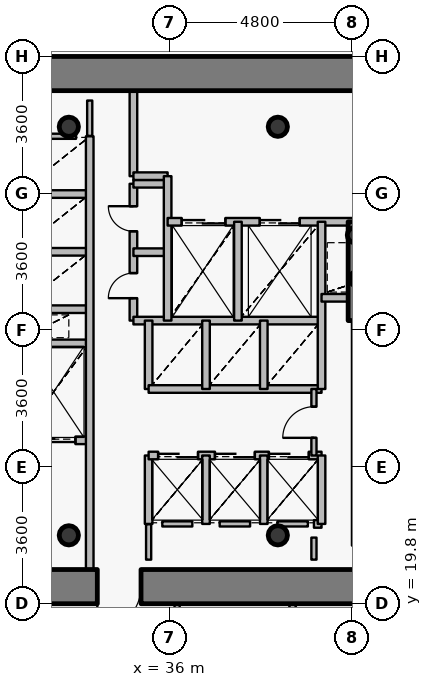
"""IFC4 building model, lengths in metres.
Left out: names, types, materials, properties, quantities, classifications, styles, units other than length and angle.
Written with IfcOpenShell. Run it as: python <this file> out.ifc"""

import sys

from ifc_helpers import new_model, si_unit, direction, frame, frame_2d, origin, origin_2d, place, context, subcontext, project, spatial, rectangle, hollow_circle, extrude, source, transform, mapped, element, fill, save


model = new_model("IFC4")
c1 = context("Model", 3, precision=1e-05, world=origin(), true_north=direction((0.0, 1.0)))
c2 = subcontext(c1, "Body", "Model", "MODEL_VIEW")
j1 = project(units=[si_unit("LENGTHUNIT", "METRE"), si_unit("PLANEANGLEUNIT", "RADIAN")], contexts=[c1])
p1 = place(None, origin())
s1 = spatial("IfcSite", under=j1, at=p1, CompositionType="ELEMENT")
p2 = place(p1, origin())
s2 = spatial("IfcBuilding", under=s1, at=p2, CompositionType="ELEMENT")
p3 = place(p2, frame((0.0, 0.0, 36.6)))
s3 = spatial("IfcBuildingStorey", under=s2, at=p3, CompositionType="ELEMENT", Elevation=36.6)
for number, where, z_axis, x_axis in (
    (1, (33.35, 21.6, 0.0), (0.0, 0.0, 1.0), (1.0, 0.0, 0.0)),
    (2, (38.85, 21.6, 0.0), (0.0, 0.0, 1.0), (1.0, 0.0, 0.0)),
    (3, (38.85, 32.35, 0.0), (0.0, 0.0, 1.0), (1.0, 0.0, 0.0)),
    (4, (33.35, 32.35, 0.0), (0.0, 0.0, 1.0), (1.0, 0.0, 0.0)),
):
    element("IfcColumn", number, at=place(p3, frame(where, z_axis=z_axis, x_axis=x_axis)), inside=s3, PredefinedType="COLUMN", context=c2, shape_type="SweptSolid", body=[
        extrude(hollow_circle(Radius=0.254, WallThickness=0.02, at=origin_2d()), origin(), (0.0, 0.0, 1.0), 4.2),
    ])
for number, where, z_axis, x_axis in (
    (5, (40.95, 28.35, 0.0), (0.0, 0.0, 1.0), (1.0, 0.0, 0.0)),
    (6, (40.88, 29.5, 0.0), (0.0, 0.0, 1.0), (1.0, 0.0, 0.0)),
):
    element("IfcColumn", number, at=place(p3, frame(where, z_axis=z_axis, x_axis=x_axis)), inside=s3, PredefinedType="COLUMN", context=c2, shape_type="SweptSolid", body=[
        extrude(hollow_circle(Radius=0.203, WallThickness=0.016, at=origin_2d()), origin(), (0.0, 0.0, 1.0), 4.2),
    ])
p4 = place(p3, frame((26.75, 33.75, 0.0), z_axis=(0.0, 0.0, 1.0), x_axis=(1.0, 0.0, 0.0)))
e7 = element("IfcWall", 7, at=p4, inside=s3, PredefinedType="SHEAR", context=c2, shape_type="SweptSolid", body=[
    extrude(rectangle(XDim=18.5, YDim=0.9, at=frame_2d((9.25, 0.0))), origin(), (0.0, 0.0, 1.0), 3.4),
])
p5 = place(p3, frame((45.25, 20.25, 0.0), z_axis=(0.0, 0.0, 1.0), x_axis=(-1.0, 0.0, 0.0)))
e8 = element("IfcWall", 8, at=p5, inside=s3, PredefinedType="SHEAR", context=c2, shape_type="SweptSolid", body=[
    extrude(rectangle(XDim=18.5, YDim=0.9, at=frame_2d((9.25, 0.0))), origin(), (0.0, 0.0, 1.0), 3.4),
])
p6 = place(p5, frame((10.0, 0.0, 0.0)))
e9 = element("IfcOpeningElement", 9, at=p6, cuts=e8, PredefinedType="OPENING", context=c2, shape_type="SweptSolid", body=[
    extrude(rectangle(XDim=1.15, YDim=2.15, at=origin_2d()), frame((0.575, 0.46, 1.075), z_axis=(0.0, -1.0, 0.0), x_axis=(1.0, 0.0, 0.0)), (0.0, 0.0, 1.0), 0.92),
])
p7 = place(p3, frame((40.9, 27.25, 0.0), z_axis=(0.0, 0.0, 1.0), x_axis=(0.0, 1.0, 0.0)))
e10 = element("IfcWall", 10, at=p7, inside=s3, PredefinedType="SHEAR", context=c2, shape_type="SweptSolid", body=[
    extrude(rectangle(XDim=2.6, YDim=0.4, at=frame_2d((1.3, 0.0))), origin(), (0.0, 0.0, 1.0), 3.55),
])
p8 = place(p3, frame((32.0, 24.1, 0.0), z_axis=(0.0, 0.0, 1.0), x_axis=(1.0, 0.0, 0.0)))
e11 = element("IfcWall", 11, at=p8, inside=s3, PredefinedType="PARTITIONING", context=c2, shape_type="SweptSolid", body=[
    extrude(rectangle(XDim=1.9, YDim=0.2, at=frame_2d((0.95, 0.0))), origin(), (0.0, 0.0, 1.0), 3.535),
])
p9 = place(p8, frame((0.375, 0.0, 0.0)))
e12 = element("IfcOpeningElement", 12, at=p9, cuts=e11, PredefinedType="OPENING", context=c2, shape_type="SweptSolid", body=[
    extrude(rectangle(XDim=1.15, YDim=2.15, at=origin_2d()), frame((0.575, 0.11, 1.075), z_axis=(0.0, -1.0, 0.0), x_axis=(1.0, 0.0, 0.0)), (0.0, 0.0, 1.0), 0.22),
])
for number, where, z_axis, x_axis in (
    (13, (32.0, 26.65, 0.0), (0.0, 0.0, 1.0), (1.0, 0.0, 0.0)),
    (14, (32.0, 27.55, 0.0), (0.0, 0.0, 1.0), (1.0, 0.0, 0.0)),
    (15, (32.0, 29.06, 0.0), (0.0, 0.0, 1.0), (1.0, 0.0, 0.0)),
    (16, (32.0, 30.58, 0.0), (0.0, 0.0, 1.0), (1.0, 0.0, 0.0)),
):
    element("IfcWall", number, at=place(p3, frame(where, z_axis=z_axis, x_axis=x_axis)), inside=s3, PredefinedType="PARTITIONING", context=c2, shape_type="SweptSolid", body=[
        extrude(rectangle(XDim=1.9, YDim=0.2, at=frame_2d((0.95, 0.0))), origin(), (0.0, 0.0, 1.0), 3.535),
    ])
p10 = place(p3, frame((33.9, 20.7, 0.0), z_axis=(0.0, 0.0, 1.0), x_axis=(0.0, 1.0, 0.0)))
e17 = element("IfcWall", 17, at=p10, inside=s3, PredefinedType="PARTITIONING", context=c2, shape_type="SweptSolid", body=[
    extrude(rectangle(XDim=11.4, YDim=0.2, at=frame_2d((5.7, 0.0))), origin(), (0.0, 0.0, 1.0), 3.535),
])
p11 = place(p3, frame((35.05, 27.25, 0.0), z_axis=(0.0, 0.0, 1.0), x_axis=(0.0, 1.0, 0.0)))
e18 = element("IfcWall", 18, at=p11, inside=s3, PredefinedType="PARTITIONING", context=c2, shape_type="SweptSolid", body=[
    extrude(rectangle(XDim=3.6, YDim=0.2, at=frame_2d((1.8, 0.0))), origin(), (0.0, 0.0, 1.0), 3.95),
])
p12 = place(p11, frame((0.59, 0.0, 0.0)))
e19 = element("IfcOpeningElement", 19, at=p12, cuts=e18, PredefinedType="OPENING", context=c2, shape_type="SweptSolid", body=[
    extrude(rectangle(XDim=0.66, YDim=2.05, at=origin_2d()), frame((0.33, 0.11, 1.025), z_axis=(0.0, -1.0, 0.0), x_axis=(1.0, 0.0, 0.0)), (0.0, 0.0, 1.0), 0.22),
])
p13 = place(p11, frame((2.35, 0.0, 0.0)))
e20 = element("IfcOpeningElement", 20, at=p13, cuts=e18, PredefinedType="OPENING", context=c2, shape_type="SweptSolid", body=[
    extrude(rectangle(XDim=0.66, YDim=2.05, at=origin_2d()), frame((0.33, 0.11, 1.025), z_axis=(0.0, -1.0, 0.0), x_axis=(1.0, 0.0, 0.0)), (0.0, 0.0, 1.0), 0.22),
])
p14 = place(p3, frame((35.05, 27.25, 0.0), z_axis=(0.0, 0.0, 1.0), x_axis=(1.0, 0.0, 0.0)))
e21 = element("IfcWall", 21, at=p14, inside=s3, PredefinedType="PARTITIONING", context=c2, shape_type="SweptSolid", body=[
    extrude(rectangle(XDim=4.95, YDim=0.2, at=frame_2d((2.475, 0.0))), origin(), (0.0, 0.0, 1.0), 3.535),
])
for number, where, z_axis, x_axis in (
    (22, (35.05, 29.05, 0.0), (0.0, 0.0, 1.0), (1.0, 0.0, 0.0)),
    (23, (35.05, 30.85, 0.0), (0.0, 0.0, 1.0), (1.0, 0.0, 0.0)),
):
    element("IfcWall", number, at=place(p3, frame(where, z_axis=z_axis, x_axis=x_axis)), inside=s3, PredefinedType="PARTITIONING", context=c2, shape_type="SweptSolid", body=[
        extrude(rectangle(XDim=0.9, YDim=0.2, at=frame_2d((0.45, 0.0))), origin(), (0.0, 0.0, 1.0), 3.95),
    ])
p15 = place(p3, frame((35.05, 31.05, 0.0), z_axis=(0.0, 0.0, 1.0), x_axis=(0.0, 1.0, 0.0)))
e24 = element("IfcWall", 24, at=p15, inside=s3, PredefinedType="PARTITIONING", context=c2, shape_type="SweptSolid", body=[
    extrude(rectangle(XDim=2.25, YDim=0.2, at=frame_2d((1.125, 0.0))), origin(), (0.0, 0.0, 1.0), 3.535),
])
p16 = place(p3, frame((35.05, 31.05, 0.0), z_axis=(0.0, 0.0, 1.0), x_axis=(1.0, 0.0, 0.0)))
e25 = element("IfcWall", 25, at=p16, inside=s3, PredefinedType="PARTITIONING", context=c2, shape_type="SweptSolid", body=[
    extrude(rectangle(XDim=0.9, YDim=0.2, at=frame_2d((0.45, 0.0))), origin(), (0.0, 0.0, 1.0), 3.95),
])
p17 = place(p3, frame((35.45, 21.9, 0.0), z_axis=(0.0, 0.0, 1.0), x_axis=(0.0, 1.0, 0.0)))
e26 = element("IfcWall", 26, at=p17, inside=s3, PredefinedType="PARTITIONING", context=c2, shape_type="SweptSolid", body=[
    extrude(rectangle(XDim=1.8, YDim=0.2, at=frame_2d((0.9, 0.0))), origin(), (0.0, 0.0, 1.0), 3.95),
])
p18 = place(p3, frame((35.45, 23.7, 0.0), z_axis=(0.0, 0.0, 1.0), x_axis=(1.0, 0.0, 0.0)))
e27 = element("IfcWall", 27, at=p18, inside=s3, PredefinedType="PARTITIONING", context=c2, shape_type="SweptSolid", body=[
    extrude(rectangle(XDim=4.55, YDim=0.2, at=frame_2d((2.275, 0.0))), origin(), (0.0, 0.0, 1.0), 3.535),
])
p19 = place(p18, frame((0.25, 0.0, 0.0)))
e28 = element("IfcOpeningElement", 28, at=p19, cuts=e27, PredefinedType="OPENING", context=c2, shape_type="SweptSolid", body=[
    extrude(rectangle(XDim=1.05, YDim=2.15, at=origin_2d()), frame((0.525, 0.11, 1.075), z_axis=(0.0, -1.0, 0.0), x_axis=(1.0, 0.0, 0.0)), (0.0, 0.0, 1.0), 0.22),
])
p20 = place(p18, frame((1.745, 0.0, 0.0)))
e29 = element("IfcOpeningElement", 29, at=p20, cuts=e27, PredefinedType="OPENING", context=c2, shape_type="SweptSolid", body=[
    extrude(rectangle(XDim=1.05, YDim=2.15, at=origin_2d()), frame((0.525, 0.11, 1.075), z_axis=(0.0, -1.0, 0.0), x_axis=(1.0, 0.0, 0.0)), (0.0, 0.0, 1.0), 0.22),
])
p21 = place(p18, frame((3.165, 0.0, 0.0)))
e30 = element("IfcOpeningElement", 30, at=p21, cuts=e27, PredefinedType="OPENING", context=c2, shape_type="SweptSolid", body=[
    extrude(rectangle(XDim=1.05, YDim=2.15, at=origin_2d()), frame((0.525, 0.11, 1.075), z_axis=(0.0, -1.0, 0.0), x_axis=(1.0, 0.0, 0.0)), (0.0, 0.0, 1.0), 0.22),
])
p22 = place(p3, frame((35.45, 25.45, 0.0), z_axis=(0.0, 0.0, 1.0), x_axis=(0.0, 1.0, 0.0)))
e31 = element("IfcWall", 31, at=p22, inside=s3, PredefinedType="PARTITIONING", context=c2, shape_type="SweptSolid", body=[
    extrude(rectangle(XDim=1.8, YDim=0.2, at=frame_2d((0.9, 0.0))), origin(), (0.0, 0.0, 1.0), 3.95),
])
p23 = place(p3, frame((35.45, 25.45, 0.0), z_axis=(0.0, 0.0, 1.0), x_axis=(1.0, 0.0, 0.0)))
e32 = element("IfcWall", 32, at=p23, inside=s3, PredefinedType="PARTITIONING", context=c2, shape_type="SweptSolid", body=[
    extrude(rectangle(XDim=4.55, YDim=0.2, at=frame_2d((2.275, 0.0))), origin(), (0.0, 0.0, 1.0), 3.535),
])
p24 = place(p3, frame((35.95, 27.25, 0.0), z_axis=(0.0, 0.0, 1.0), x_axis=(0.0, 1.0, 0.0)))
e33 = element("IfcWall", 33, at=p24, inside=s3, PredefinedType="PARTITIONING", context=c2, shape_type="SweptSolid", body=[
    extrude(rectangle(XDim=3.8, YDim=0.2, at=frame_2d((1.9, 0.0))), origin(), (0.0, 0.0, 1.0), 3.95),
])
p25 = place(p3, frame((35.95, 29.85, 0.0), z_axis=(0.0, 0.0, 1.0), x_axis=(1.0, 0.0, 0.0)))
e34 = element("IfcWall", 34, at=p25, inside=s3, PredefinedType="PARTITIONING", context=c2, shape_type="SweptSolid", body=[
    extrude(rectangle(XDim=8.49, YDim=0.2, at=frame_2d((4.245, 0.0))), origin(), (0.0, 0.0, 1.0), 3.535),
])
p26 = place(p25, frame((6.1, 0.0, 0.0)))
e35 = element("IfcOpeningElement", 35, at=p26, cuts=e34, PredefinedType="OPENING", context=c2, shape_type="SweptSolid", body=[
    extrude(rectangle(XDim=1.2, YDim=2.15, at=origin_2d()), frame((0.6, 0.11, 1.075), z_axis=(0.0, -1.0, 0.0), x_axis=(1.0, 0.0, 0.0)), (0.0, 0.0, 1.0), 0.22),
])
p27 = place(p25, frame((0.37, 0.0, 0.0)))
e36 = element("IfcOpeningElement", 36, at=p27, cuts=e34, PredefinedType="OPENING", context=c2, shape_type="SweptSolid", body=[
    extrude(rectangle(XDim=1.15, YDim=2.15, at=origin_2d()), frame((0.575, 0.11, 1.075), z_axis=(0.0, -1.0, 0.0), x_axis=(1.0, 0.0, 0.0)), (0.0, 0.0, 1.0), 0.22),
])
p28 = place(p25, frame((2.425, 0.0, 0.0)))
e37 = element("IfcOpeningElement", 37, at=p28, cuts=e34, PredefinedType="OPENING", context=c2, shape_type="SweptSolid", body=[
    extrude(rectangle(XDim=1.05, YDim=2.15, at=origin_2d()), frame((0.525, 0.11, 1.075), z_axis=(0.0, -1.0, 0.0), x_axis=(1.0, 0.0, 0.0)), (0.0, 0.0, 1.0), 0.22),
])
p29 = place(p3, frame((36.2, 17.9, 0.0), z_axis=(0.0, 0.0, 1.0), x_axis=(0.0, 1.0, 0.0)))
e38 = element("IfcWall", 38, at=p29, inside=s3, PredefinedType="PARTITIONING", context=c2, shape_type="SweptSolid", body=[
    extrude(rectangle(XDim=1.9, YDim=0.135, at=frame_2d((0.95, 0.0))), origin(), (0.0, 0.0, 1.0), 3.285),
])
for number, where, z_axis, x_axis in (
    (39, (36.96, 21.9, 0.0), (0.0, 0.0, 1.0), (0.0, 1.0, 0.0)),
    (40, (36.96, 25.45, 0.0), (0.0, 0.0, 1.0), (0.0, 1.0, 0.0)),
):
    element("IfcWall", number, at=place(p3, frame(where, z_axis=z_axis, x_axis=x_axis)), inside=s3, PredefinedType="PARTITIONING", context=c2, shape_type="SweptSolid", body=[
        extrude(rectangle(XDim=1.8, YDim=0.2, at=frame_2d((0.9, 0.0))), origin(), (0.0, 0.0, 1.0), 3.95),
    ])
p30 = place(p3, frame((37.8, 27.25, 0.0), z_axis=(0.0, 0.0, 1.0), x_axis=(0.0, 1.0, 0.0)))
e41 = element("IfcWall", 41, at=p30, inside=s3, PredefinedType="PARTITIONING", context=c2, shape_type="SweptSolid", body=[
    extrude(rectangle(XDim=2.6, YDim=0.2, at=frame_2d((1.3, 0.0))), origin(), (0.0, 0.0, 1.0), 3.95),
])
for number, where, z_axis, x_axis in (
    (42, (38.48, 21.9, 0.0), (0.0, 0.0, 1.0), (0.0, 1.0, 0.0)),
    (43, (38.48, 25.45, 0.0), (0.0, 0.0, 1.0), (0.0, 1.0, 0.0)),
):
    element("IfcWall", number, at=place(p3, frame(where, z_axis=z_axis, x_axis=x_axis)), inside=s3, PredefinedType="PARTITIONING", context=c2, shape_type="SweptSolid", body=[
        extrude(rectangle(XDim=1.8, YDim=0.2, at=frame_2d((0.9, 0.0))), origin(), (0.0, 0.0, 1.0), 3.95),
    ])
p31 = place(p3, frame((39.206, 19.8, 0.0), z_axis=(0.0, 0.0, 1.0), x_axis=(0.406734516924, -0.913546404263, 0.0)))
e44 = element("IfcWall", 44, at=p31, inside=s3, PredefinedType="PARTITIONING", context=c2, shape_type="SweptSolid", body=[
    extrude(rectangle(XDim=17.213, YDim=0.15, at=frame_2d((8.606, 0.0))), origin(), (0.0, 0.0, 1.0), 3.285),
])
p32 = place(p31, frame((4.228, 0.0, 0.0)))
e45 = element("IfcOpeningElement", 45, at=p32, cuts=e44, PredefinedType="OPENING", context=c2, shape_type="SweptSolid", body=[
    extrude(rectangle(XDim=0.82, YDim=2.1, at=origin_2d()), frame((0.41, 0.085, 1.05), z_axis=(0.0, -1.0, 0.0), x_axis=(1.0, 0.0, 0.0)), (0.0, 0.0, 1.0), 0.17),
])
p33 = place(p31, frame((12.679, 0.0, 0.0)))
e46 = element("IfcOpeningElement", 46, at=p33, cuts=e44, PredefinedType="OPENING", context=c2, shape_type="SweptSolid", body=[
    extrude(rectangle(XDim=1.05, YDim=2.15, at=origin_2d()), frame((0.525, 0.085, 1.075), z_axis=(0.0, -1.0, 0.0), x_axis=(1.0, 0.0, 0.0)), (0.0, 0.0, 1.0), 0.17),
])
p34 = place(p3, frame((39.8, 21.9, 0.0), z_axis=(0.0, 0.0, 1.0), x_axis=(1.0, 0.0, 0.0)))
e47 = element("IfcWall", 47, at=p34, inside=s3, PredefinedType="PARTITIONING", context=c2, shape_type="SweptSolid", body=[
    extrude(rectangle(XDim=0.2, YDim=0.2, at=frame_2d((0.1, 0.0))), origin(), (0.0, 0.0, 1.0), 3.95),
])
p35 = place(p3, frame((39.8, 23.7, 0.0), z_axis=(0.0, 0.0, 1.0), x_axis=(0.0, 1.0, 0.0)))
e48 = element("IfcWall", 48, at=p35, inside=s3, PredefinedType="PARTITIONING", context=c2, shape_type="SweptSolid", body=[
    extrude(rectangle(XDim=1.75, YDim=0.135, at=frame_2d((0.875, 0.0))), origin(), (0.0, 0.0, 1.0), 3.95),
])
p36 = place(p35, frame((0.465, 0.0, 0.0)))
e49 = element("IfcOpeningElement", 49, at=p36, cuts=e48, PredefinedType="OPENING", context=c2, shape_type="SweptSolid", body=[
    extrude(rectangle(XDim=0.82, YDim=2.1, at=origin_2d()), frame((0.41, 0.078, 1.05), z_axis=(0.0, -1.0, 0.0), x_axis=(1.0, 0.0, 0.0)), (0.0, 0.0, 1.0), 0.155),
])
p37 = place(p3, frame((40.0, 21.9, 0.0), z_axis=(0.0, 0.0, 1.0), x_axis=(0.0, 1.0, 0.0)))
e50 = element("IfcWall", 50, at=p37, inside=s3, PredefinedType="PARTITIONING", context=c2, shape_type="SweptSolid", body=[
    extrude(rectangle(XDim=1.8, YDim=0.2, at=frame_2d((0.9, 0.0))), origin(), (0.0, 0.0, 1.0), 3.95),
])
p38 = place(p3, frame((40.0, 25.45, 0.0), z_axis=(0.0, 0.0, 1.0), x_axis=(0.0, 1.0, 0.0)))
e51 = element("IfcWall", 51, at=p38, inside=s3, PredefinedType="PARTITIONING", context=c2, shape_type="SweptSolid", body=[
    extrude(rectangle(XDim=4.4, YDim=0.2, at=frame_2d((2.2, 0.0))), origin(), (0.0, 0.0, 1.0), 3.95),
])
p39 = place(p3, frame((40.0, 27.85, 0.0), z_axis=(0.0, 0.0, 1.0), x_axis=(1.0, 0.0, 0.0)))
e52 = element("IfcWall", 52, at=p39, inside=s3, PredefinedType="PARTITIONING", context=c2, shape_type="SweptSolid", body=[
    extrude(rectangle(XDim=0.9, YDim=0.2, at=frame_2d((0.45, 0.0))), origin(), (0.0, 0.0, 1.0), 3.95),
])
p40 = place(p3, frame((40.9, 21.33, 0.0), z_axis=(0.0, 0.0, 1.0), x_axis=(0.0, 1.0, 0.0)))
e53 = element("IfcWall", 53, at=p40, inside=s3, PredefinedType="PARTITIONING", context=c2, shape_type="SweptSolid", body=[
    extrude(rectangle(XDim=5.91, YDim=0.2, at=frame_2d((2.955, 0.0))), origin(), (0.0, 0.0, 1.0), 3.485),
])
p41 = place(p3, frame((36.6, 21.9, 0.0), z_axis=(0.0, 0.0, 1.0), x_axis=(-1.0, 0.0, 0.0)))
e54 = element("IfcWall", 54, at=p41, inside=s3, PredefinedType="PARTITIONING", context=c2, shape_type="SweptSolid", body=[
    extrude(rectangle(XDim=0.79, YDim=0.135, at=frame_2d((0.395, 0.0))), origin(), (0.0, 0.0, 1.0), 3.95),
])
p42 = place(p3, frame((38.12, 21.9, 0.0), z_axis=(0.0, 0.0, 1.0), x_axis=(-1.0, 0.0, 0.0)))
e55 = element("IfcWall", 55, at=p42, inside=s3, PredefinedType="PARTITIONING", context=c2, shape_type="SweptSolid", body=[
    extrude(rectangle(XDim=0.8, YDim=0.135, at=frame_2d((0.4, 0.0))), origin(), (0.0, 0.0, 1.0), 3.95),
])
p43 = place(p3, frame((39.64, 21.9, 0.0), z_axis=(0.0, 0.0, 1.0), x_axis=(-1.0, 0.0, 0.0)))
e56 = element("IfcWall", 56, at=p43, inside=s3, PredefinedType="PARTITIONING", context=c2, shape_type="SweptSolid", body=[
    extrude(rectangle(XDim=0.8, YDim=0.135, at=frame_2d((0.4, 0.0))), origin(), (0.0, 0.0, 1.0), 3.535),
])
p44 = place(p3, frame((32.36, 32.1, 0.0), z_axis=(0.0, 0.0, 1.0), x_axis=(1.0, 0.0, 0.0)))
e57 = element("IfcWall", 57, at=p44, inside=s3, PredefinedType="PARTITIONING", context=c2, shape_type="SweptSolid", body=[
    extrude(rectangle(XDim=1.18, YDim=0.135, at=frame_2d((0.59, 0.0))), origin(), (0.0, 0.0, 1.0), 3.535),
])
p45 = place(p3, frame((39.8, 20.96, 0.0), z_axis=(0.0, 0.0, 1.0), x_axis=(0.0, 1.0, 0.0)))
e58 = element("IfcWall", 58, at=p45, inside=s3, PredefinedType="PARTITIONING", context=c2, shape_type="SweptSolid", body=[
    extrude(rectangle(XDim=0.58, YDim=0.135, at=frame_2d((0.29, 0.0))), origin(), (0.0, 0.0, 1.0), 3.485),
])
for number, where, z_axis, x_axis in (
    (59, (35.45, 21.89, 0.0), (0.0, 0.0, 1.0), (0.0, -1.0, 0.0)),
    (60, (33.9, 32.11, 0.0), (0.0, 0.0, 1.0), (0.0, 1.0, 0.0)),
):
    element("IfcWall", number, at=place(p3, frame(where, z_axis=z_axis, x_axis=x_axis)), inside=s3, PredefinedType="PARTITIONING", context=c2, shape_type="SweptSolid", body=[
        extrude(rectangle(XDim=0.93, YDim=0.135, at=frame_2d((0.465, 0.0))), origin(), (0.0, 0.0, 1.0), 3.535),
    ])
m1 = source(origin(), c2, "Body", "SweptSolid", [
    extrude(rectangle(XDim=1.15, YDim=2.15, at=origin_2d()), frame((0.575, 0.025, 1.075), z_axis=(0.0, -1.0, 0.0), x_axis=(1.0, 0.0, 0.0)), (0.0, 0.0, 1.0), 0.05),
])
p46 = place(p6, origin())
e61 = element("IfcDoor", 61, at=p46, inside=s3, OperationType="SINGLE_SWING_RIGHT", PredefinedType="DOOR", context=c2, shape_type="MappedRepresentation", body=[
    mapped(m1, transform((0.0, 0.0, 0.0), x_axis=(1.0, 0.0, 0.0), y_axis=(0.0, 1.0, 0.0), z_axis=(0.0, 0.0, 1.0), scale=1.0)),
])
fill(e9, e61)
m2 = source(origin(), c2, "Body", "SweptSolid", [
    extrude(rectangle(XDim=1.15, YDim=2.15, at=origin_2d()), frame((0.575, 0.025, 1.075), z_axis=(0.0, -1.0, 0.0), x_axis=(1.0, 0.0, 0.0)), (0.0, 0.0, 1.0), 0.05),
])
p47 = place(p27, origin())
e62 = element("IfcDoor", 62, at=p47, inside=s3, OperationType="DOUBLE_DOOR_SLIDING", PredefinedType="USERDEFINED", context=c2, shape_type="MappedRepresentation", body=[
    mapped(m2, transform((0.0, 0.0, 0.0), x_axis=(1.0, 0.0, 0.0), y_axis=(0.0, 1.0, 0.0), z_axis=(0.0, 0.0, 1.0), scale=1.0)),
])
fill(e36, e62)
p48 = place(p9, origin())
e63 = element("IfcDoor", 63, at=p48, inside=s3, OperationType="DOUBLE_DOOR_SLIDING", PredefinedType="USERDEFINED", context=c2, shape_type="MappedRepresentation", body=[
    mapped(m2, transform((0.0, 0.0, 0.0), x_axis=(1.0, 0.0, 0.0), y_axis=(0.0, 1.0, 0.0), z_axis=(0.0, 0.0, 1.0), scale=1.0)),
])
fill(e12, e63)
m3 = source(origin(), c2, "Body", "SweptSolid", [
    extrude(rectangle(XDim=1.05, YDim=2.15, at=origin_2d()), frame((0.525, 0.025, 1.075), z_axis=(0.0, -1.0, 0.0), x_axis=(1.0, 0.0, 0.0)), (0.0, 0.0, 1.0), 0.05),
])
p49 = place(p28, origin())
e64 = element("IfcDoor", 64, at=p49, inside=s3, OperationType="DOUBLE_DOOR_SLIDING", PredefinedType="USERDEFINED", context=c2, shape_type="MappedRepresentation", body=[
    mapped(m3, transform((0.0, 0.0, 0.0), x_axis=(1.0, 0.0, 0.0), y_axis=(0.0, 1.0, 0.0), z_axis=(0.0, 0.0, 1.0), scale=1.0)),
])
fill(e37, e64)
p50 = place(p19, origin())
e65 = element("IfcDoor", 65, at=p50, inside=s3, OperationType="DOUBLE_DOOR_SLIDING", PredefinedType="USERDEFINED", context=c2, shape_type="MappedRepresentation", body=[
    mapped(m3, transform((0.0, 0.0, 0.0), x_axis=(1.0, 0.0, 0.0), y_axis=(0.0, 1.0, 0.0), z_axis=(0.0, 0.0, 1.0), scale=1.0)),
])
fill(e28, e65)
p51 = place(p20, origin())
e66 = element("IfcDoor", 66, at=p51, inside=s3, OperationType="DOUBLE_DOOR_SLIDING", PredefinedType="USERDEFINED", context=c2, shape_type="MappedRepresentation", body=[
    mapped(m3, transform((0.0, 0.0, 0.0), x_axis=(1.0, 0.0, 0.0), y_axis=(0.0, 1.0, 0.0), z_axis=(0.0, 0.0, 1.0), scale=1.0)),
])
fill(e29, e66)
p52 = place(p21, origin())
e67 = element("IfcDoor", 67, at=p52, inside=s3, OperationType="DOUBLE_DOOR_SLIDING", PredefinedType="USERDEFINED", context=c2, shape_type="MappedRepresentation", body=[
    mapped(m3, transform((0.0, 0.0, 0.0), x_axis=(1.0, 0.0, 0.0), y_axis=(0.0, 1.0, 0.0), z_axis=(0.0, 0.0, 1.0), scale=1.0)),
])
fill(e30, e67)
m4 = source(origin(), c2, "Body", "SweptSolid", [
    extrude(rectangle(XDim=0.66, YDim=2.05, at=origin_2d()), frame((0.33, 0.025, 1.025), z_axis=(0.0, -1.0, 0.0), x_axis=(1.0, 0.0, 0.0)), (0.0, 0.0, 1.0), 0.05),
])
p53 = place(p12, origin())
e68 = element("IfcDoor", 68, at=p53, inside=s3, OperationType="SINGLE_SWING_LEFT", PredefinedType="USERDEFINED", context=c2, shape_type="MappedRepresentation", body=[
    mapped(m4, transform((0.0, 0.0, 0.0), x_axis=(1.0, 0.0, 0.0), y_axis=(0.0, 1.0, 0.0), z_axis=(0.0, 0.0, 1.0), scale=1.0)),
])
fill(e19, e68)
p54 = place(p13, origin())
e69 = element("IfcDoor", 69, at=p54, inside=s3, OperationType="SINGLE_SWING_RIGHT", PredefinedType="USERDEFINED", context=c2, shape_type="MappedRepresentation", body=[
    mapped(m4, transform((0.0, 0.0, 0.0), x_axis=(1.0, 0.0, 0.0), y_axis=(0.0, 1.0, 0.0), z_axis=(0.0, 0.0, 1.0), scale=1.0)),
])
fill(e20, e69)
m5 = source(origin(), c2, "Body", "SweptSolid", [
    extrude(rectangle(XDim=0.82, YDim=2.1, at=origin_2d()), frame((0.41, 0.025, 1.05), z_axis=(0.0, -1.0, 0.0), x_axis=(1.0, 0.0, 0.0)), (0.0, 0.0, 1.0), 0.05),
])
p55 = place(p36, origin())
e70 = element("IfcDoor", 70, at=p55, inside=s3, OperationType="SINGLE_SWING_LEFT", PredefinedType="DOOR", context=c2, shape_type="MappedRepresentation", body=[
    mapped(m5, transform((0.0, 0.0, 0.0), x_axis=(1.0, 0.0, 0.0), y_axis=(0.0, 1.0, 0.0), z_axis=(0.0, 0.0, 1.0), scale=1.0)),
])
fill(e49, e70)
save(model, sys.argv[1])
